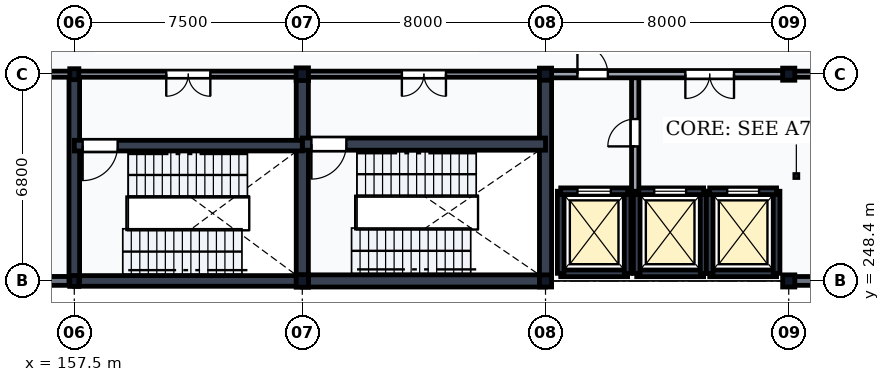
"""IFC4 building model, lengths in metres.
Left out: names, types, materials, properties, quantities, classifications, styles, units other than length and angle.
Written with IfcOpenShell. Run it as: python <this file> out.ifc"""

import sys

from ifc_helpers import new_model, si_unit, direction, frame, frame_2d, origin, origin_2d, place, context, subcontext, project, spatial, rectangle, i_section, extrude, element, fill, save


model = new_model("IFC4")
c1 = context("Model", 3, precision=1e-05, world=origin(), true_north=direction((0.0, 1.0)))
c2 = subcontext(c1, "Body", "Model", "MODEL_VIEW")
j1 = project(units=[si_unit("LENGTHUNIT", "METRE"), si_unit("PLANEANGLEUNIT", "RADIAN")], contexts=[c1])
p1 = place(None, origin())
s1 = spatial("IfcSite", under=j1, at=p1, CompositionType="ELEMENT")
p2 = place(p1, origin())
s2 = spatial("IfcBuilding", under=s1, at=p2, CompositionType="ELEMENT")
p3 = place(p2, frame((0.0, 0.0, 5.4)))
s3 = spatial("IfcBuildingStorey", under=s2, at=p3, CompositionType="ELEMENT", Elevation=5.4)
for number, where, z_axis, x_axis in (
    (1, (157.5, 248.4, 0.0), (0.0, 0.0, 1.0), (1.0, 0.0, 0.0)),
    (2, (157.5, 255.2, 0.0), (0.0, 0.0, 1.0), (1.0, 0.0, 0.0)),
):
    element("IfcColumn", number, at=place(p3, frame(where, z_axis=z_axis, x_axis=x_axis)), inside=s3, PredefinedType="COLUMN", context=c2, shape_type="SweptSolid", body=[
        extrude(i_section(OverallWidth=0.3, OverallDepth=0.4, WebThickness=0.013, FlangeThickness=0.024, FilletRadius=0.027, at=origin_2d()), origin(), (0.0, 0.0, 1.0), 5.1),
    ])
for number, where, z_axis, x_axis in (
    (3, (165.0, 248.4, 0.0), (0.0, 0.0, 1.0), (1.0, 0.0, 0.0)),
    (4, (165.0, 255.2, 0.0), (0.0, 0.0, 1.0), (1.0, 0.0, 0.0)),
):
    element("IfcColumn", number, at=place(p3, frame(where, z_axis=z_axis, x_axis=x_axis)), inside=s3, PredefinedType="COLUMN", context=c2, shape_type="SweptSolid", body=[
        extrude(i_section(OverallWidth=0.418, OverallDepth=0.455, WebThickness=0.042, FlangeThickness=0.068, FilletRadius=0.015, at=origin_2d()), origin(), (0.0, 0.0, 1.0), 5.1),
    ])
for number, where, z_axis, x_axis in (
    (5, (173.0, 248.4, 0.0), (0.0, 0.0, 1.0), (1.0, 0.0, 0.0)),
    (6, (173.0, 255.2, 0.0), (0.0, 0.0, 1.0), (1.0, 0.0, 0.0)),
    (7, (181.0, 248.4, 0.0), (0.0, 0.0, 1.0), (1.0, 0.0, 0.0)),
    (8, (181.0, 255.2, 0.0), (0.0, 0.0, 1.0), (1.0, 0.0, 0.0)),
):
    element("IfcColumn", number, at=place(p3, frame(where, z_axis=z_axis, x_axis=x_axis)), inside=s3, PredefinedType="COLUMN", context=c2, shape_type="SweptSolid", body=[
        extrude(i_section(OverallWidth=0.412, OverallDepth=0.435, WebThickness=0.036, FlangeThickness=0.057, FilletRadius=0.015, at=origin_2d()), origin(), (0.0, 0.0, 1.0), 5.1),
    ])
p4 = place(p3, frame((150.006, 248.4, 0.0), z_axis=(0.0, 0.0, 1.0), x_axis=(1.0, 0.0, 0.0)))
e9 = element("IfcWall", 9, at=p4, inside=s3, PredefinedType="SOLIDWALL", context=c2, shape_type="SweptSolid", body=[
    extrude(rectangle(XDim=7.488, YDim=0.29, at=frame_2d((3.744, 0.0))), origin(), (0.0, 0.0, 1.0), 4.578),
])
p5 = place(p4, frame((3.069, 0.0, 0.95)))
e10 = element("IfcOpeningElement", 10, at=p5, cuts=e9, PredefinedType="OPENING", context=c2, shape_type="SweptSolid", body=[
    extrude(rectangle(XDim=1.35, YDim=1.8, at=frame_2d((0.675, 0.9))), frame((0.0, 0.16, 0.0), z_axis=(0.0, -1.0, 0.0), x_axis=(1.0, 0.0, 0.0)), (0.0, 0.0, 1.0), 0.32),
])
p6 = place(p3, frame((181.006, 248.4, 0.0), z_axis=(0.0, 0.0, 1.0), x_axis=(1.0, 0.0, 0.0)))
e11 = element("IfcWall", 11, at=p6, inside=s3, PredefinedType="SOLIDWALL", context=c2, shape_type="SweptSolid", body=[
    extrude(rectangle(XDim=7.988, YDim=0.29, at=frame_2d((3.994, 0.0))), origin(), (0.0, 0.0, 1.0), 4.548),
])
p7 = place(p6, frame((3.319, 0.0, 0.85)))
e12 = element("IfcOpeningElement", 12, at=p7, cuts=e11, PredefinedType="OPENING", context=c2, shape_type="SweptSolid", body=[
    extrude(rectangle(XDim=0.75, YDim=2.0, at=frame_2d((0.375, 1.0))), frame((0.0, 0.16, 0.0), z_axis=(0.0, -1.0, 0.0), x_axis=(1.0, 0.0, 0.0)), (0.0, 0.0, 1.0), 0.32),
])
p8 = place(p3, frame((165.0, 248.4, 0.0), z_axis=(0.0, 0.0, 1.0), x_axis=(1.0, 0.0, 0.0)))
e13 = element("IfcWall", 13, at=p8, inside=s3, PredefinedType="SHEAR", context=c2, shape_type="SweptSolid", body=[
    extrude(rectangle(XDim=8.0, YDim=0.4, at=frame_2d((4.0, 0.0))), origin(), (0.0, 0.0, 1.0), 4.86),
])
for number, where, z_axis, x_axis in (
    (14, (165.0, 248.4, 0.0), (0.0, 0.0, 1.0), (0.0, 1.0, 0.0)),
    (15, (173.0, 248.4, 0.0), (0.0, 0.0, 1.0), (0.0, 1.0, 0.0)),
):
    element("IfcWall", number, at=place(p3, frame(where, z_axis=z_axis, x_axis=x_axis)), inside=s3, PredefinedType="SHEAR", context=c2, shape_type="SweptSolid", body=[
        extrude(rectangle(XDim=6.8, YDim=0.4, at=frame_2d((3.4, 0.0))), origin(), (0.0, 0.0, 1.0), 4.86),
    ])
p9 = place(p3, frame((165.0, 252.9, 0.0), z_axis=(0.0, 0.0, 1.0), x_axis=(1.0, 0.0, 0.0)))
e16 = element("IfcWall", 16, at=p9, inside=s3, PredefinedType="SHEAR", context=c2, shape_type="SweptSolid", body=[
    extrude(rectangle(XDim=8.0, YDim=0.4, at=frame_2d((4.0, 0.0))), origin(), (0.0, 0.0, 1.0), 4.86),
])
p10 = place(p9, frame((0.3, 0.0, 0.0)))
e17 = element("IfcOpeningElement", 17, at=p10, cuts=e16, PredefinedType="OPENING", context=c2, shape_type="SweptSolid", body=[
    extrude(rectangle(XDim=1.15, YDim=2.15, at=frame_2d((0.575, 1.075))), frame((0.0, 0.215, 0.0), z_axis=(0.0, -1.0, 0.0), x_axis=(1.0, 0.0, 0.0)), (0.0, 0.0, 1.0), 0.43),
])
p11 = place(p3, frame((165.0, 255.2, 0.0), z_axis=(0.0, 0.0, 1.0), x_axis=(1.0, 0.0, 0.0)))
e18 = element("IfcWall", 18, at=p11, inside=s3, PredefinedType="PARTITIONING", context=c2, shape_type="SweptSolid", body=[
    extrude(rectangle(XDim=8.0, YDim=0.2, at=frame_2d((4.0, 0.0))), origin(), (0.0, 0.0, 1.0), 4.358),
])
p12 = place(p11, frame((3.275, 0.0, 0.0)))
e19 = element("IfcOpeningElement", 19, at=p12, cuts=e18, PredefinedType="OPENING", context=c2, shape_type="SweptSolid", body=[
    extrude(rectangle(XDim=1.45, YDim=2.2, at=frame_2d((0.725, 1.1))), frame((0.0, 0.115, 0.0), z_axis=(0.0, -1.0, 0.0), x_axis=(1.0, 0.0, 0.0)), (0.0, 0.0, 1.0), 0.23),
])
p13 = place(p3, frame((157.5, 248.4, 0.0), z_axis=(0.0, 0.0, 1.0), x_axis=(1.0, 0.0, 0.0)))
e20 = element("IfcWall", 20, at=p13, inside=s3, PredefinedType="SHEAR", context=c2, shape_type="SweptSolid", body=[
    extrude(rectangle(XDim=7.5, YDim=0.35, at=frame_2d((3.75, 0.0))), origin(), (0.0, 0.0, 1.0), 4.86),
])
p14 = place(p3, frame((157.5, 248.4, 0.0), z_axis=(0.0, 0.0, 1.0), x_axis=(0.0, 1.0, 0.0)))
e21 = element("IfcWall", 21, at=p14, inside=s3, PredefinedType="SHEAR", context=c2, shape_type="SweptSolid", body=[
    extrude(rectangle(XDim=6.8, YDim=0.35, at=frame_2d((3.4, 0.0))), origin(), (0.0, 0.0, 1.0), 4.86),
])
p15 = place(p3, frame((157.5, 252.85, 0.0), z_axis=(0.0, 0.0, 1.0), x_axis=(1.0, 0.0, 0.0)))
e22 = element("IfcWall", 22, at=p15, inside=s3, PredefinedType="SHEAR", context=c2, shape_type="SweptSolid", body=[
    extrude(rectangle(XDim=7.5, YDim=0.35, at=frame_2d((3.75, 0.0))), origin(), (0.0, 0.0, 1.0), 4.86),
])
p16 = place(p15, frame((0.275, 0.0, 0.0)))
e23 = element("IfcOpeningElement", 23, at=p16, cuts=e22, PredefinedType="OPENING", context=c2, shape_type="SweptSolid", body=[
    extrude(rectangle(XDim=1.15, YDim=2.15, at=frame_2d((0.575, 1.075))), frame((0.0, 0.19, 0.0), z_axis=(0.0, -1.0, 0.0), x_axis=(1.0, 0.0, 0.0)), (0.0, 0.0, 1.0), 0.38),
])
p17 = place(p3, frame((157.5, 255.2, 0.0), z_axis=(0.0, 0.0, 1.0), x_axis=(1.0, 0.0, 0.0)))
e24 = element("IfcWall", 24, at=p17, inside=s3, PredefinedType="PARTITIONING", context=c2, shape_type="SweptSolid", body=[
    extrude(rectangle(XDim=7.5, YDim=0.2, at=frame_2d((3.75, 0.0))), origin(), (0.0, 0.0, 1.0), 4.498),
])
p18 = place(p17, frame((3.025, 0.0, 0.0)))
e25 = element("IfcOpeningElement", 25, at=p18, cuts=e24, PredefinedType="OPENING", context=c2, shape_type="SweptSolid", body=[
    extrude(rectangle(XDim=1.45, YDim=2.2, at=frame_2d((0.725, 1.1))), frame((0.0, 0.115, 0.0), z_axis=(0.0, -1.0, 0.0), x_axis=(1.0, 0.0, 0.0)), (0.0, 0.0, 1.0), 0.23),
])
p19 = place(p3, frame((173.5, 248.65, 0.0), z_axis=(0.0, 0.0, 1.0), x_axis=(1.0, 0.0, 0.0)))
e26 = element("IfcWall", 26, at=p19, inside=s3, PredefinedType="SHEAR", context=c2, shape_type="SweptSolid", body=[
    extrude(rectangle(XDim=2.2, YDim=0.22, at=frame_2d((1.1, 0.0))), origin(), (0.0, 0.0, 1.0), 4.86),
])
for number, where, z_axis, x_axis in (
    (27, (173.5, 248.65, 0.0), (0.0, 0.0, 1.0), (0.0, 1.0, 0.0)),
    (28, (175.7, 248.65, 0.0), (0.0, 0.0, 1.0), (0.0, 1.0, 0.0)),
):
    element("IfcWall", number, at=place(p3, frame(where, z_axis=z_axis, x_axis=x_axis)), inside=s3, PredefinedType="SHEAR", context=c2, shape_type="SweptSolid", body=[
        extrude(rectangle(XDim=2.7, YDim=0.22, at=frame_2d((1.35, 0.0))), origin(), (0.0, 0.0, 1.0), 4.86),
    ])
p20 = place(p3, frame((173.5, 251.35, 0.0), z_axis=(0.0, 0.0, 1.0), x_axis=(1.0, 0.0, 0.0)))
e29 = element("IfcWall", 29, at=p20, inside=s3, PredefinedType="SHEAR", context=c2, shape_type="SweptSolid", body=[
    extrude(rectangle(XDim=2.2, YDim=0.22, at=frame_2d((1.1, 0.0))), origin(), (0.0, 0.0, 1.0), 4.86),
])
p21 = place(p20, frame((0.55, 0.0, 0.0)))
e30 = element("IfcOpeningElement", 30, at=p21, cuts=e29, PredefinedType="OPENING", context=c2, shape_type="SweptSolid", body=[
    extrude(rectangle(XDim=1.1, YDim=2.15, at=frame_2d((0.55, 1.075))), frame((0.0, 0.125, 0.0), z_axis=(0.0, -1.0, 0.0), x_axis=(1.0, 0.0, 0.0)), (0.0, 0.0, 1.0), 0.25),
])
p22 = place(p3, frame((176.0, 248.65, 0.0), z_axis=(0.0, 0.0, 1.0), x_axis=(1.0, 0.0, 0.0)))
e31 = element("IfcWall", 31, at=p22, inside=s3, PredefinedType="SHEAR", context=c2, shape_type="SweptSolid", body=[
    extrude(rectangle(XDim=2.2, YDim=0.22, at=frame_2d((1.1, 0.0))), origin(), (0.0, 0.0, 1.0), 4.86),
])
for number, where, z_axis, x_axis in (
    (32, (176.0, 248.65, 0.0), (0.0, 0.0, 1.0), (0.0, 1.0, 0.0)),
    (33, (178.2, 248.65, 0.0), (0.0, 0.0, 1.0), (0.0, 1.0, 0.0)),
):
    element("IfcWall", number, at=place(p3, frame(where, z_axis=z_axis, x_axis=x_axis)), inside=s3, PredefinedType="SHEAR", context=c2, shape_type="SweptSolid", body=[
        extrude(rectangle(XDim=2.7, YDim=0.22, at=frame_2d((1.35, 0.0))), origin(), (0.0, 0.0, 1.0), 4.86),
    ])
p23 = place(p3, frame((176.0, 251.35, 0.0), z_axis=(0.0, 0.0, 1.0), x_axis=(1.0, 0.0, 0.0)))
e34 = element("IfcWall", 34, at=p23, inside=s3, PredefinedType="SHEAR", context=c2, shape_type="SweptSolid", body=[
    extrude(rectangle(XDim=2.2, YDim=0.22, at=frame_2d((1.1, 0.0))), origin(), (0.0, 0.0, 1.0), 4.86),
])
p24 = place(p23, frame((0.575, 0.0, 0.0)))
e35 = element("IfcOpeningElement", 35, at=p24, cuts=e34, PredefinedType="OPENING", context=c2, shape_type="SweptSolid", body=[
    extrude(rectangle(XDim=1.05, YDim=2.15, at=frame_2d((0.525, 1.075))), frame((0.0, 0.125, 0.0), z_axis=(0.0, -1.0, 0.0), x_axis=(1.0, 0.0, 0.0)), (0.0, 0.0, 1.0), 0.25),
])
p25 = place(p3, frame((178.4, 248.65, 0.0), z_axis=(0.0, 0.0, 1.0), x_axis=(1.0, 0.0, 0.0)))
e36 = element("IfcWall", 36, at=p25, inside=s3, PredefinedType="SHEAR", context=c2, shape_type="SweptSolid", body=[
    extrude(rectangle(XDim=2.2, YDim=0.22, at=frame_2d((1.1, 0.0))), origin(), (0.0, 0.0, 1.0), 4.86),
])
for number, where, z_axis, x_axis in (
    (37, (178.4, 248.65, 0.0), (0.0, 0.0, 1.0), (0.0, 1.0, 0.0)),
    (38, (180.6, 248.65, 0.0), (0.0, 0.0, 1.0), (0.0, 1.0, 0.0)),
):
    element("IfcWall", number, at=place(p3, frame(where, z_axis=z_axis, x_axis=x_axis)), inside=s3, PredefinedType="SHEAR", context=c2, shape_type="SweptSolid", body=[
        extrude(rectangle(XDim=2.7, YDim=0.22, at=frame_2d((1.35, 0.0))), origin(), (0.0, 0.0, 1.0), 4.86),
    ])
p26 = place(p3, frame((178.4, 251.35, 0.0), z_axis=(0.0, 0.0, 1.0), x_axis=(1.0, 0.0, 0.0)))
e39 = element("IfcWall", 39, at=p26, inside=s3, PredefinedType="SHEAR", context=c2, shape_type="SweptSolid", body=[
    extrude(rectangle(XDim=2.2, YDim=0.22, at=frame_2d((1.1, 0.0))), origin(), (0.0, 0.0, 1.0), 4.86),
])
p27 = place(p26, frame((0.575, 0.0, 0.0)))
e40 = element("IfcOpeningElement", 40, at=p27, cuts=e39, PredefinedType="OPENING", context=c2, shape_type="SweptSolid", body=[
    extrude(rectangle(XDim=1.05, YDim=2.15, at=frame_2d((0.525, 1.075))), frame((0.0, 0.125, 0.0), z_axis=(0.0, -1.0, 0.0), x_axis=(1.0, 0.0, 0.0)), (0.0, 0.0, 1.0), 0.25),
])
p28 = place(p3, frame((175.95, 251.35, 0.0), z_axis=(0.0, 0.0, 1.0), x_axis=(0.0, 1.0, 0.0)))
e41 = element("IfcWall", 41, at=p28, inside=s3, PredefinedType="PARTITIONING", context=c2, shape_type="SweptSolid", body=[
    extrude(rectangle(XDim=3.85, YDim=0.24, at=frame_2d((1.925, 0.0))), origin(), (0.0, 0.0, 1.0), 4.86),
])
p29 = place(p28, frame((1.475, 0.0, 0.0)))
e42 = element("IfcOpeningElement", 42, at=p29, cuts=e41, PredefinedType="OPENING", context=c2, shape_type="SweptSolid", body=[
    extrude(rectangle(XDim=0.9, YDim=2.1, at=frame_2d((0.45, 1.05))), frame((0.0, 0.135, 0.0), z_axis=(0.0, -1.0, 0.0), x_axis=(1.0, 0.0, 0.0)), (0.0, 0.0, 1.0), 0.27),
])
p30 = place(p3, frame((173.0, 255.2, 0.0), z_axis=(0.0, 0.0, 1.0), x_axis=(1.0, 0.0, 0.0)))
e43 = element("IfcWall", 43, at=p30, inside=s3, PredefinedType="PARTITIONING", context=c2, shape_type="SweptSolid", body=[
    extrude(rectangle(XDim=8.0, YDim=0.24, at=frame_2d((4.0, 0.0))), origin(), (0.0, 0.0, 1.0), 4.358),
])
p31 = place(p30, frame((1.05, 0.0, 0.0)))
e44 = element("IfcOpeningElement", 44, at=p31, cuts=e43, PredefinedType="OPENING", context=c2, shape_type="SweptSolid", body=[
    extrude(rectangle(XDim=1.0, YDim=2.1, at=frame_2d((0.5, 1.05))), frame((0.0, 0.135, 0.0), z_axis=(0.0, -1.0, 0.0), x_axis=(1.0, 0.0, 0.0)), (0.0, 0.0, 1.0), 0.27),
])
p32 = place(p30, frame((4.6, 0.0, 0.0)))
e45 = element("IfcOpeningElement", 45, at=p32, cuts=e43, PredefinedType="OPENING", context=c2, shape_type="SweptSolid", body=[
    extrude(rectangle(XDim=1.6, YDim=2.25, at=frame_2d((0.8, 1.125))), frame((0.0, 0.135, 0.0), z_axis=(0.0, -1.0, 0.0), x_axis=(1.0, 0.0, 0.0)), (0.0, 0.0, 1.0), 0.27),
])
p33 = place(p3, frame((181.0, 255.2, 0.0), z_axis=(0.0, 0.0, 1.0), x_axis=(1.0, 0.0, 0.0)))
e46 = element("IfcWall", 46, at=p33, inside=s3, PredefinedType="PARTITIONING", context=c2, shape_type="SweptSolid", body=[
    extrude(rectangle(XDim=8.0, YDim=0.2, at=frame_2d((4.0, 0.0))), origin(), (0.0, 0.0, 1.0), 4.358),
])
p34 = place(p33, frame((0.85, 0.0, 0.0)))
e47 = element("IfcOpeningElement", 47, at=p34, cuts=e46, PredefinedType="OPENING", context=c2, shape_type="SweptSolid", body=[
    extrude(rectangle(XDim=0.9, YDim=2.1, at=frame_2d((0.45, 1.05))), frame((0.0, 0.115, 0.0), z_axis=(0.0, -1.0, 0.0), x_axis=(1.0, 0.0, 0.0)), (0.0, 0.0, 1.0), 0.23),
])
p35 = place(p33, frame((3.25, 0.0, 0.0)))
e48 = element("IfcOpeningElement", 48, at=p35, cuts=e46, PredefinedType="OPENING", context=c2, shape_type="SweptSolid", body=[
    extrude(rectangle(XDim=0.9, YDim=2.1, at=frame_2d((0.45, 1.05))), frame((0.0, 0.115, 0.0), z_axis=(0.0, -1.0, 0.0), x_axis=(1.0, 0.0, 0.0)), (0.0, 0.0, 1.0), 0.23),
])
p36 = place(p33, frame((5.075, 0.0, 0.0)))
e49 = element("IfcOpeningElement", 49, at=p36, cuts=e46, PredefinedType="OPENING", context=c2, shape_type="SweptSolid", body=[
    extrude(rectangle(XDim=0.95, YDim=2.1, at=frame_2d((0.475, 1.05))), frame((0.0, 0.115, 0.0), z_axis=(0.0, -1.0, 0.0), x_axis=(1.0, 0.0, 0.0)), (0.0, 0.0, 1.0), 0.23),
])
p37 = place(p33, frame((6.5, 0.0, 0.0)))
e50 = element("IfcOpeningElement", 50, at=p37, cuts=e46, PredefinedType="OPENING", context=c2, shape_type="SweptSolid", body=[
    extrude(rectangle(XDim=0.85, YDim=2.1, at=frame_2d((0.425, 1.05))), frame((0.0, 0.115, 0.0), z_axis=(0.0, -1.0, 0.0), x_axis=(1.0, 0.0, 0.0)), (0.0, 0.0, 1.0), 0.23),
])
p38 = place(p3, frame((135.0, 255.2, 0.0), z_axis=(0.0, 0.0, 1.0), x_axis=(1.0, 0.0, 0.0)))
e51 = element("IfcWall", 51, at=p38, inside=s3, PredefinedType="PARTITIONING", context=c2, shape_type="SweptSolid", body=[
    extrude(rectangle(XDim=22.5, YDim=0.2, at=frame_2d((11.25, 0.0))), origin(), (0.0, 0.0, 1.0), 4.488),
])
p39 = place(p38, frame((10.75, 0.0, 0.0)))
e52 = element("IfcOpeningElement", 52, at=p39, cuts=e51, PredefinedType="OPENING", context=c2, shape_type="SweptSolid", body=[
    extrude(rectangle(XDim=1.0, YDim=2.1, at=frame_2d((0.5, 1.05))), frame((0.0, 0.115, 0.0), z_axis=(0.0, -1.0, 0.0), x_axis=(1.0, 0.0, 0.0)), (0.0, 0.0, 1.0), 0.23),
])
p40 = place(p10, frame((1.15, 0.0, 0.0), z_axis=(0.0, 0.0, 1.0), x_axis=(-1.0, 0.0, 0.0)))
e53 = element("IfcDoor", 53, at=p40, inside=s3, OperationType="SINGLE_SWING_RIGHT", PredefinedType="DOOR", context=c2, shape_type="SweptSolid", body=[
    extrude(rectangle(XDim=1.15, YDim=2.15, at=frame_2d((0.575, 1.075))), frame((0.0, 0.025, 0.0), z_axis=(0.0, -1.0, 0.0), x_axis=(1.0, 0.0, 0.0)), (0.0, 0.0, 1.0), 0.05),
])
fill(e17, e53)
p41 = place(p12, frame((1.45, 0.0, 0.0), z_axis=(0.0, 0.0, 1.0), x_axis=(-1.0, 0.0, 0.0)))
e54 = element("IfcDoor", 54, at=p41, inside=s3, OperationType="DOUBLE_DOOR_SINGLE_SWING", PredefinedType="DOOR", context=c2, shape_type="SweptSolid", body=[
    extrude(rectangle(XDim=1.45, YDim=2.2, at=frame_2d((0.725, 1.1))), frame((0.0, 0.025, 0.0), z_axis=(0.0, -1.0, 0.0), x_axis=(1.0, 0.0, 0.0)), (0.0, 0.0, 1.0), 0.05),
])
fill(e19, e54)
p42 = place(p16, frame((1.15, 0.0, 0.0), z_axis=(0.0, 0.0, 1.0), x_axis=(-1.0, 0.0, 0.0)))
e55 = element("IfcDoor", 55, at=p42, inside=s3, OperationType="SINGLE_SWING_RIGHT", PredefinedType="DOOR", context=c2, shape_type="SweptSolid", body=[
    extrude(rectangle(XDim=1.15, YDim=2.15, at=frame_2d((0.575, 1.075))), frame((0.0, 0.025, 0.0), z_axis=(0.0, -1.0, 0.0), x_axis=(1.0, 0.0, 0.0)), (0.0, 0.0, 1.0), 0.05),
])
fill(e23, e55)
p43 = place(p18, frame((1.45, 0.0, 0.0), z_axis=(0.0, 0.0, 1.0), x_axis=(-1.0, 0.0, 0.0)))
e56 = element("IfcDoor", 56, at=p43, inside=s3, OperationType="DOUBLE_DOOR_SINGLE_SWING", PredefinedType="DOOR", context=c2, shape_type="SweptSolid", body=[
    extrude(rectangle(XDim=1.45, YDim=2.2, at=frame_2d((0.725, 1.1))), frame((0.0, 0.025, 0.0), z_axis=(0.0, -1.0, 0.0), x_axis=(1.0, 0.0, 0.0)), (0.0, 0.0, 1.0), 0.05),
])
fill(e25, e56)
p44 = place(p21, origin())
e57 = element("IfcDoor", 57, at=p44, inside=s3, OperationType="DOUBLE_DOOR_SLIDING", PredefinedType="USERDEFINED", context=c2, shape_type="SweptSolid", body=[
    extrude(rectangle(XDim=1.1, YDim=2.15, at=frame_2d((0.55, 1.075))), frame((0.0, 0.025, 0.0), z_axis=(0.0, -1.0, 0.0), x_axis=(1.0, 0.0, 0.0)), (0.0, 0.0, 1.0), 0.05),
])
fill(e30, e57)
p45 = place(p24, origin())
e58 = element("IfcDoor", 58, at=p45, inside=s3, OperationType="DOUBLE_DOOR_SLIDING", PredefinedType="USERDEFINED", context=c2, shape_type="SweptSolid", body=[
    extrude(rectangle(XDim=1.05, YDim=2.15, at=frame_2d((0.525, 1.075))), frame((0.0, 0.025, 0.0), z_axis=(0.0, -1.0, 0.0), x_axis=(1.0, 0.0, 0.0)), (0.0, 0.0, 1.0), 0.05),
])
fill(e35, e58)
p46 = place(p27, origin())
e59 = element("IfcDoor", 59, at=p46, inside=s3, OperationType="DOUBLE_DOOR_SLIDING", PredefinedType="USERDEFINED", context=c2, shape_type="SweptSolid", body=[
    extrude(rectangle(XDim=1.05, YDim=2.15, at=frame_2d((0.525, 1.075))), frame((0.0, 0.025, 0.0), z_axis=(0.0, -1.0, 0.0), x_axis=(1.0, 0.0, 0.0)), (0.0, 0.0, 1.0), 0.05),
])
fill(e40, e59)
p47 = place(p29, frame((0.9, 0.0, 0.0), z_axis=(0.0, 0.0, 1.0), x_axis=(-1.0, 0.0, 0.0)))
e60 = element("IfcDoor", 60, at=p47, inside=s3, OperationType="SINGLE_SWING_LEFT", PredefinedType="DOOR", context=c2, shape_type="SweptSolid", body=[
    extrude(rectangle(XDim=0.9, YDim=2.1, at=frame_2d((0.45, 1.05))), frame((0.0, 0.025, 0.0), z_axis=(0.0, -1.0, 0.0), x_axis=(1.0, 0.0, 0.0)), (0.0, 0.0, 1.0), 0.05),
])
fill(e42, e60)
p48 = place(p31, frame((1.0, 0.0, 0.0), z_axis=(0.0, 0.0, 1.0), x_axis=(-1.0, 0.0, 0.0)))
e61 = element("IfcDoor", 61, at=p48, inside=s3, OperationType="SINGLE_SWING_RIGHT", PredefinedType="DOOR", context=c2, shape_type="SweptSolid", body=[
    extrude(rectangle(XDim=1.0, YDim=2.1, at=frame_2d((0.5, 1.05))), frame((0.0, 0.025, 0.0), z_axis=(0.0, -1.0, 0.0), x_axis=(1.0, 0.0, 0.0)), (0.0, 0.0, 1.0), 0.05),
])
fill(e44, e61)
p49 = place(p32, origin())
e62 = element("IfcDoor", 62, at=p49, inside=s3, OperationType="DOUBLE_DOOR_SINGLE_SWING", PredefinedType="DOOR", context=c2, shape_type="SweptSolid", body=[
    extrude(rectangle(XDim=1.6, YDim=2.25, at=frame_2d((0.8, 1.125))), frame((0.0, 0.025, 0.0), z_axis=(0.0, -1.0, 0.0), x_axis=(1.0, 0.0, 0.0)), (0.0, 0.0, 1.0), 0.05),
])
fill(e45, e62)
save(model, sys.argv[1])
